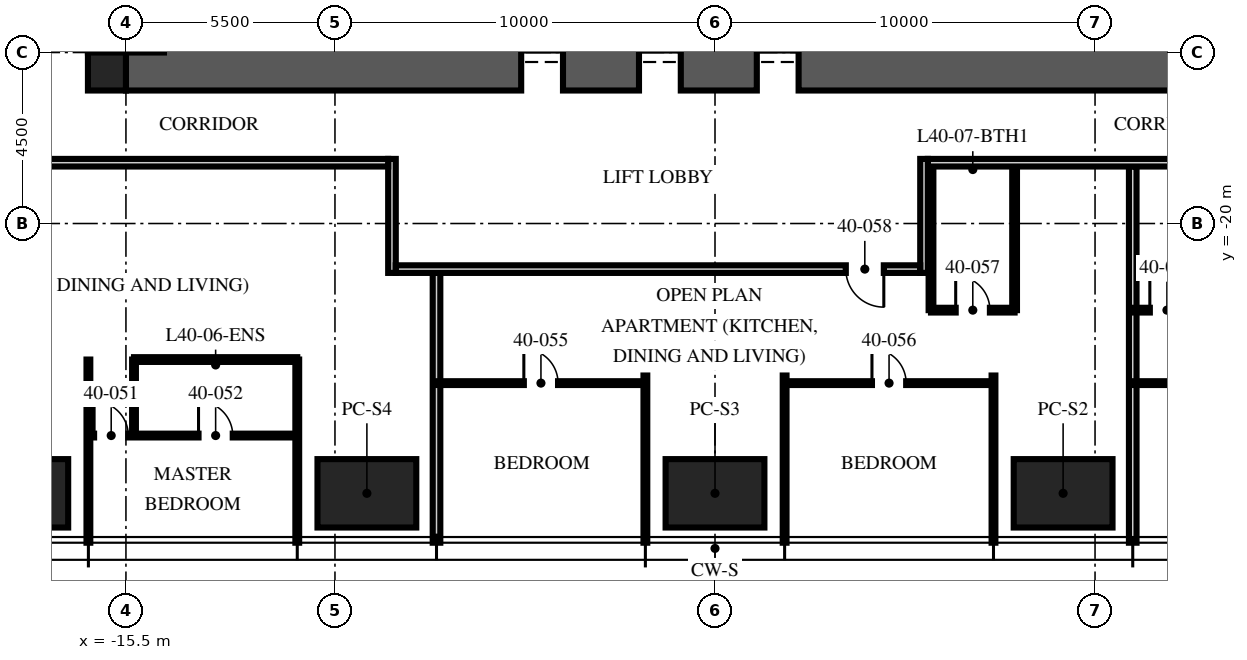
"""IFC4 building model, lengths in metres.
Left out: names, types, materials, properties, quantities, classifications, styles, units other than length and angle.
Written with IfcOpenShell. Run it as: python <this file> out.ifc"""

import sys

from ifc_helpers import new_model, si_unit, direction, frame, frame_2d, origin, origin_2d, place, context, subcontext, project, spatial, rectangle, extrude, element, fill, save


model = new_model("IFC4")
c1 = context("Model", 3, precision=1e-05, world=origin(), true_north=direction((0.0, 1.0)))
c2 = subcontext(c1, "Body", "Model", "MODEL_VIEW")
j1 = project(units=[si_unit("LENGTHUNIT", "METRE"), si_unit("PLANEANGLEUNIT", "RADIAN")], contexts=[c1])
p1 = place(None, origin())
s1 = spatial("IfcSite", under=j1, at=p1, CompositionType="ELEMENT")
p2 = place(p1, origin())
s2 = spatial("IfcBuilding", under=s1, at=p2, CompositionType="ELEMENT")
p3 = place(p2, frame((0.0, 0.0, 159.75)))
s3 = spatial("IfcBuildingStorey", under=s2, at=p3, CompositionType="ELEMENT", Elevation=159.75)
p4 = place(p3, frame((-15.5, -15.5, -0.25), z_axis=(0.0, 0.0, 1.0), x_axis=(1.0, 0.0, 0.0)))
e1 = element("IfcWall", 1, at=p4, inside=s3, PredefinedType="SHEAR", context=c2, shape_type="SweptSolid", body=[
    extrude(rectangle(XDim=31.0, YDim=2.0, at=frame_2d((15.5, 0.0))), origin(), (0.0, 0.0, 1.0), 3.75),
])
p5 = place(p4, frame((10.4, 0.0, 0.25)))
e2 = element("IfcOpeningElement", 2, at=p5, cuts=e1, PredefinedType="OPENING", context=c2, shape_type="SweptSolid", body=[
    extrude(rectangle(XDim=1.1, YDim=2.1, at=frame_2d((0.55, 1.05))), frame((0.0, 1.01, 0.0), z_axis=(0.0, -1.0, 0.0), x_axis=(1.0, 0.0, 0.0)), (0.0, 0.0, 1.0), 2.02),
])
p6 = place(p4, frame((13.5, 0.0, 0.25)))
e3 = element("IfcOpeningElement", 3, at=p6, cuts=e1, PredefinedType="OPENING", context=c2, shape_type="SweptSolid", body=[
    extrude(rectangle(XDim=1.1, YDim=2.1, at=frame_2d((0.55, 1.05))), frame((0.0, 1.01, 0.0), z_axis=(0.0, -1.0, 0.0), x_axis=(1.0, 0.0, 0.0)), (0.0, 0.0, 1.0), 2.02),
])
p7 = place(p4, frame((16.6, 0.0, 0.25)))
e4 = element("IfcOpeningElement", 4, at=p7, cuts=e1, PredefinedType="OPENING", context=c2, shape_type="SweptSolid", body=[
    extrude(rectangle(XDim=1.1, YDim=2.1, at=frame_2d((0.55, 1.05))), frame((0.0, 1.01, 0.0), z_axis=(0.0, -1.0, 0.0), x_axis=(1.0, 0.0, 0.0)), (0.0, 0.0, 1.0), 2.02),
])
p8 = place(p3, frame((-16.0, -16.0, -0.25), z_axis=(0.0, 0.0, 1.0), x_axis=(1.0, 0.0, 0.0)))
e5 = element("IfcColumn", 5, at=p8, inside=s3, PredefinedType="COLUMN", context=c2, shape_type="SweptSolid", body=[
    extrude(rectangle(XDim=1.0, YDim=1.0, at=origin_2d()), origin(), (0.0, 0.0, 1.0), 3.75),
])
for number, where, z_axis, x_axis in (
    (6, (9.16, -27.1, 0.0), (0.0, 0.0, 1.0), (1.0, 0.0, 0.0)),
    (7, (0.0, -27.1, 0.0), (0.0, 0.0, 1.0), (1.0, 0.0, 0.0)),
    (8, (-9.16, -27.1, 0.0), (0.0, 0.0, 1.0), (1.0, 0.0, 0.0)),
    (9, (-18.32, -27.1, 0.0), (0.0, 0.0, 1.0), (1.0, 0.0, 0.0)),
):
    element("IfcColumn", number, at=place(p3, frame(where, z_axis=z_axis, x_axis=x_axis)), inside=s3, PredefinedType="COLUMN", context=c2, shape_type="SweptSolid", body=[
        extrude(rectangle(XDim=2.6, YDim=1.8, at=origin_2d()), origin(), (0.0, 0.0, 1.0), 3.75),
    ])
for number, where, z_axis, x_axis in (
    (10, (-16.488, -23.58, 0.0), (0.0, 0.0, 1.0), (0.0, -1.0, 0.0)),
    (11, (-10.992, -23.58, 0.0), (0.0, 0.0, 1.0), (0.0, -1.0, 0.0)),
):
    element("IfcWall", number, at=place(p3, frame(where, z_axis=z_axis, x_axis=x_axis)), inside=s3, PredefinedType="PARTITIONING", context=c2, shape_type="SweptSolid", body=[
        extrude(rectangle(XDim=4.82, YDim=0.1, at=frame_2d((2.41, 0.0))), origin(), (0.0, 0.0, 1.0), 2.81),
    ])
p9 = place(p3, frame((-7.328, -21.3, 0.0), z_axis=(0.0, 0.0, 1.0), x_axis=(0.0, -1.0, 0.0)))
e12 = element("IfcWall", 12, at=p9, inside=s3, PredefinedType="PARTITIONING", context=c2, shape_type="SweptSolid", body=[
    extrude(rectangle(XDim=7.1, YDim=0.2, at=frame_2d((3.55, 0.0))), origin(), (0.0, 0.0, 1.0), 2.81),
])
for number, where, z_axis, x_axis in (
    (13, (-1.832, -24.0, 0.0), (0.0, 0.0, 1.0), (0.0, -1.0, 0.0)),
    (14, (1.832, -24.0, 0.0), (0.0, 0.0, 1.0), (0.0, -1.0, 0.0)),
    (15, (7.328, -24.0, 0.0), (0.0, 0.0, 1.0), (0.0, -1.0, 0.0)),
):
    element("IfcWall", number, at=place(p3, frame(where, z_axis=z_axis, x_axis=x_axis)), inside=s3, PredefinedType="PARTITIONING", context=c2, shape_type="SweptSolid", body=[
        extrude(rectangle(XDim=4.4, YDim=0.1, at=frame_2d((2.2, 0.0))), origin(), (0.0, 0.0, 1.0), 2.81),
    ])
p10 = place(p3, frame((10.992, -18.5, 0.0), z_axis=(0.0, 0.0, 1.0), x_axis=(0.0, -1.0, 0.0)))
e16 = element("IfcWall", 16, at=p10, inside=s3, PredefinedType="PARTITIONING", context=c2, shape_type="SweptSolid", body=[
    extrude(rectangle(XDim=9.9, YDim=0.2, at=frame_2d((4.95, 0.0))), origin(), (0.0, 0.0, 1.0), 2.81),
])
p11 = place(p3, frame((-16.488, -25.58, 0.0), z_axis=(0.0, 0.0, 1.0), x_axis=(1.0, 0.0, 0.0)))
e17 = element("IfcWall", 17, at=p11, inside=s3, PredefinedType="PARTITIONING", context=c2, shape_type="SweptSolid", body=[
    extrude(rectangle(XDim=5.496, YDim=0.1, at=frame_2d((2.748, 0.0))), origin(), (0.0, 0.0, 1.0), 2.81),
])
p12 = place(p11, frame((0.15, 0.0, 0.0)))
e18 = element("IfcOpeningElement", 18, at=p12, cuts=e17, PredefinedType="OPENING", context=c2, shape_type="SweptSolid", body=[
    extrude(rectangle(XDim=0.9, YDim=2.1, at=frame_2d((0.45, 1.05))), frame((0.0, 0.06, 0.0), z_axis=(0.0, -1.0, 0.0), x_axis=(1.0, 0.0, 0.0)), (0.0, 0.0, 1.0), 0.12),
])
p13 = place(p11, frame((2.898, 0.0, 0.0)))
e19 = element("IfcOpeningElement", 19, at=p13, cuts=e17, PredefinedType="OPENING", context=c2, shape_type="SweptSolid", body=[
    extrude(rectangle(XDim=0.9, YDim=2.1, at=frame_2d((0.45, 1.05))), frame((0.0, 0.06, 0.0), z_axis=(0.0, -1.0, 0.0), x_axis=(1.0, 0.0, 0.0)), (0.0, 0.0, 1.0), 0.12),
])
p14 = place(p3, frame((-15.288, -23.58, 0.0), z_axis=(0.0, 0.0, 1.0), x_axis=(0.0, -1.0, 0.0)))
e20 = element("IfcWall", 20, at=p14, inside=s3, PredefinedType="PARTITIONING", context=c2, shape_type="SweptSolid", body=[
    extrude(rectangle(XDim=2.0, YDim=0.1, at=frame_2d((1.0, 0.0))), origin(), (0.0, 0.0, 1.0), 3.5),
])
p15 = place(p3, frame((-15.288, -23.58, 0.0), z_axis=(0.0, 0.0, 1.0), x_axis=(1.0, 0.0, 0.0)))
e21 = element("IfcWall", 21, at=p15, inside=s3, PredefinedType="PARTITIONING", context=c2, shape_type="SweptSolid", body=[
    extrude(rectangle(XDim=4.296, YDim=0.125, at=frame_2d((2.148, 0.0))), origin(), (0.0, 0.0, 1.0), 2.81),
])
p16 = place(p3, frame((-7.328, -24.2, 0.0), z_axis=(0.0, 0.0, 1.0), x_axis=(1.0, 0.0, 0.0)))
e22 = element("IfcWall", 22, at=p16, inside=s3, PredefinedType="PARTITIONING", context=c2, shape_type="SweptSolid", body=[
    extrude(rectangle(XDim=5.496, YDim=0.1, at=frame_2d((2.748, 0.0))), origin(), (0.0, 0.0, 1.0), 2.81),
])
p17 = place(p16, frame((2.298, 0.0, 0.0)))
e23 = element("IfcOpeningElement", 23, at=p17, cuts=e22, PredefinedType="OPENING", context=c2, shape_type="SweptSolid", body=[
    extrude(rectangle(XDim=0.9, YDim=2.1, at=frame_2d((0.45, 1.05))), frame((0.0, 0.06, 0.0), z_axis=(0.0, -1.0, 0.0), x_axis=(1.0, 0.0, 0.0)), (0.0, 0.0, 1.0), 0.12),
])
p18 = place(p3, frame((1.832, -24.2, 0.0), z_axis=(0.0, 0.0, 1.0), x_axis=(1.0, 0.0, 0.0)))
e24 = element("IfcWall", 24, at=p18, inside=s3, PredefinedType="PARTITIONING", context=c2, shape_type="SweptSolid", body=[
    extrude(rectangle(XDim=5.496, YDim=0.1, at=frame_2d((2.748, 0.0))), origin(), (0.0, 0.0, 1.0), 2.81),
])
p19 = place(p18, frame((2.298, 0.0, 0.0)))
e25 = element("IfcOpeningElement", 25, at=p19, cuts=e24, PredefinedType="OPENING", context=c2, shape_type="SweptSolid", body=[
    extrude(rectangle(XDim=0.9, YDim=2.1, at=frame_2d((0.45, 1.05))), frame((0.0, 0.06, 0.0), z_axis=(0.0, -1.0, 0.0), x_axis=(1.0, 0.0, 0.0)), (0.0, 0.0, 1.0), 0.12),
])
p20 = place(p3, frame((5.684, -22.28, 0.0), z_axis=(0.0, 0.0, 1.0), x_axis=(1.0, 0.0, 0.0)))
e26 = element("IfcWall", 26, at=p20, inside=s3, PredefinedType="PARTITIONING", context=c2, shape_type="SweptSolid", body=[
    extrude(rectangle(XDim=2.2, YDim=0.125, at=frame_2d((1.1, 0.0))), origin(), (0.0, 0.0, 1.0), 3.5),
])
p21 = place(p20, frame((0.65, 0.0, 0.0)))
e27 = element("IfcOpeningElement", 27, at=p21, cuts=e26, PredefinedType="OPENING", context=c2, shape_type="SweptSolid", body=[
    extrude(rectangle(XDim=0.9, YDim=2.1, at=frame_2d((0.45, 1.05))), frame((0.0, 0.073, 0.0), z_axis=(0.0, -1.0, 0.0), x_axis=(1.0, 0.0, 0.0)), (0.0, 0.0, 1.0), 0.145),
])
for number, where, z_axis, x_axis in (
    (28, (5.684, -18.5, 0.0), (0.0, 0.0, 1.0), (0.0, -1.0, 0.0)),
    (29, (7.884, -18.5, 0.0), (0.0, 0.0, 1.0), (0.0, -1.0, 0.0)),
):
    element("IfcWall", number, at=place(p3, frame(where, z_axis=z_axis, x_axis=x_axis)), inside=s3, PredefinedType="PARTITIONING", context=c2, shape_type="SweptSolid", body=[
        extrude(rectangle(XDim=3.78, YDim=0.125, at=frame_2d((1.89, 0.0))), origin(), (0.0, 0.0, 1.0), 3.5),
    ])
p22 = place(p3, frame((10.992, -24.2, 0.0), z_axis=(0.0, 0.0, 1.0), x_axis=(1.0, 0.0, 0.0)))
e30 = element("IfcWall", 30, at=p22, inside=s3, PredefinedType="PARTITIONING", context=c2, shape_type="SweptSolid", body=[
    extrude(rectangle(XDim=5.496, YDim=0.1, at=frame_2d((2.748, 0.0))), origin(), (0.0, 0.0, 1.0), 2.81),
])
p23 = place(p22, frame((2.298, 0.0, 0.0)))
e31 = element("IfcOpeningElement", 31, at=p23, cuts=e30, PredefinedType="OPENING", context=c2, shape_type="SweptSolid", body=[
    extrude(rectangle(XDim=0.9, YDim=2.1, at=frame_2d((0.45, 1.05))), frame((0.0, 0.06, 0.0), z_axis=(0.0, -1.0, 0.0), x_axis=(1.0, 0.0, 0.0)), (0.0, 0.0, 1.0), 0.12),
])
p24 = place(p3, frame((10.992, -22.28, 0.0), z_axis=(0.0, 0.0, 1.0), x_axis=(1.0, 0.0, 0.0)))
e32 = element("IfcWall", 32, at=p24, inside=s3, PredefinedType="PARTITIONING", context=c2, shape_type="SweptSolid", body=[
    extrude(rectangle(XDim=1.8, YDim=0.125, at=frame_2d((0.9, 0.0))), origin(), (0.0, 0.0, 1.0), 3.5),
])
p25 = place(p24, frame((0.45, 0.0, 0.0)))
e33 = element("IfcOpeningElement", 33, at=p25, cuts=e32, PredefinedType="OPENING", context=c2, shape_type="SweptSolid", body=[
    extrude(rectangle(XDim=0.9, YDim=2.1, at=frame_2d((0.45, 1.05))), frame((0.0, 0.073, 0.0), z_axis=(0.0, -1.0, 0.0), x_axis=(1.0, 0.0, 0.0)), (0.0, 0.0, 1.0), 0.145),
])
p26 = place(p3, frame((18.5, -18.4, 0.0), z_axis=(0.0, 0.0, 1.0), x_axis=(-1.0, 0.0, 0.0)))
e34 = element("IfcWall", 34, at=p26, inside=s3, PredefinedType="PARTITIONING", context=c2, shape_type="SweptSolid", body=[
    extrude(rectangle(XDim=12.9, YDim=0.2, at=frame_2d((6.45, 0.0))), origin(), (0.0, 0.0, 1.0), 2.3),
])
for number, where, z_axis, x_axis in (
    (35, (5.5, -18.3, 0.0), (0.0, 0.0, 1.0), (0.0, -1.0, 0.0)),
    (36, (-8.5, -18.3, 0.0), (0.0, 0.0, 1.0), (0.0, -1.0, 0.0)),
):
    element("IfcWall", number, at=place(p3, frame(where, z_axis=z_axis, x_axis=x_axis)), inside=s3, PredefinedType="PARTITIONING", context=c2, shape_type="SweptSolid", body=[
        extrude(rectangle(XDim=3.0, YDim=0.2, at=frame_2d((1.5, 0.0))), origin(), (0.0, 0.0, 1.0), 3.5),
    ])
p27 = place(p3, frame((5.4, -21.2, 0.0), z_axis=(0.0, 0.0, 1.0), x_axis=(-1.0, 0.0, 0.0)))
e37 = element("IfcWall", 37, at=p27, inside=s3, PredefinedType="PARTITIONING", context=c2, shape_type="SweptSolid", body=[
    extrude(rectangle(XDim=13.8, YDim=0.2, at=frame_2d((6.9, 0.0))), origin(), (0.0, 0.0, 1.0), 2.7),
])
p28 = place(p27, frame((0.958, 0.0, 0.0)))
e38 = element("IfcOpeningElement", 38, at=p28, cuts=e37, PredefinedType="OPENING", context=c2, shape_type="SweptSolid", body=[
    extrude(rectangle(XDim=1.0, YDim=2.2, at=frame_2d((0.5, 1.1))), frame((0.0, 0.11, 0.0), z_axis=(0.0, -1.0, 0.0), x_axis=(1.0, 0.0, 0.0)), (0.0, 0.0, 1.0), 0.22),
])
p29 = place(p3, frame((-8.6, -18.4, 0.0), z_axis=(0.0, 0.0, 1.0), x_axis=(-1.0, 0.0, 0.0)))
e39 = element("IfcWall", 39, at=p29, inside=s3, PredefinedType="PARTITIONING", context=c2, shape_type="SweptSolid", body=[
    extrude(rectangle(XDim=9.9, YDim=0.2, at=frame_2d((4.95, 0.0))), origin(), (0.0, 0.0, 1.0), 2.3),
])
p30 = place(p5, origin())
e40 = element("IfcDoor", 40, at=p30, inside=s3, OperationType="DOUBLE_DOOR_SLIDING", PredefinedType="DOOR", context=c2, shape_type="SweptSolid", body=[
    extrude(rectangle(XDim=1.1, YDim=2.1, at=frame_2d((0.55, 1.05))), frame((0.0, 0.025, 0.0), z_axis=(0.0, -1.0, 0.0), x_axis=(1.0, 0.0, 0.0)), (0.0, 0.0, 1.0), 0.05),
])
fill(e2, e40)
p31 = place(p6, origin())
e41 = element("IfcDoor", 41, at=p31, inside=s3, OperationType="DOUBLE_DOOR_SLIDING", PredefinedType="DOOR", context=c2, shape_type="SweptSolid", body=[
    extrude(rectangle(XDim=1.1, YDim=2.1, at=frame_2d((0.55, 1.05))), frame((0.0, 0.025, 0.0), z_axis=(0.0, -1.0, 0.0), x_axis=(1.0, 0.0, 0.0)), (0.0, 0.0, 1.0), 0.05),
])
fill(e3, e41)
p32 = place(p7, origin())
e42 = element("IfcDoor", 42, at=p32, inside=s3, OperationType="DOUBLE_DOOR_SLIDING", PredefinedType="DOOR", context=c2, shape_type="SweptSolid", body=[
    extrude(rectangle(XDim=1.1, YDim=2.1, at=frame_2d((0.55, 1.05))), frame((0.0, 0.025, 0.0), z_axis=(0.0, -1.0, 0.0), x_axis=(1.0, 0.0, 0.0)), (0.0, 0.0, 1.0), 0.05),
])
fill(e4, e42)
p33 = place(p12, origin())
e43 = element("IfcDoor", 43, at=p33, inside=s3, OperationType="SINGLE_SWING_LEFT", PredefinedType="DOOR", context=c2, shape_type="SweptSolid", body=[
    extrude(rectangle(XDim=0.9, YDim=2.1, at=frame_2d((0.45, 1.05))), frame((0.0, 0.025, 0.0), z_axis=(0.0, -1.0, 0.0), x_axis=(1.0, 0.0, 0.0)), (0.0, 0.0, 1.0), 0.05),
])
fill(e18, e43)
p34 = place(p13, origin())
e44 = element("IfcDoor", 44, at=p34, inside=s3, OperationType="SINGLE_SWING_LEFT", PredefinedType="DOOR", context=c2, shape_type="SweptSolid", body=[
    extrude(rectangle(XDim=0.9, YDim=2.1, at=frame_2d((0.45, 1.05))), frame((0.0, 0.025, 0.0), z_axis=(0.0, -1.0, 0.0), x_axis=(1.0, 0.0, 0.0)), (0.0, 0.0, 1.0), 0.05),
])
fill(e19, e44)
p35 = place(p17, origin())
e45 = element("IfcDoor", 45, at=p35, inside=s3, OperationType="SINGLE_SWING_LEFT", PredefinedType="DOOR", context=c2, shape_type="SweptSolid", body=[
    extrude(rectangle(XDim=0.9, YDim=2.1, at=frame_2d((0.45, 1.05))), frame((0.0, 0.025, 0.0), z_axis=(0.0, -1.0, 0.0), x_axis=(1.0, 0.0, 0.0)), (0.0, 0.0, 1.0), 0.05),
])
fill(e23, e45)
p36 = place(p19, origin())
e46 = element("IfcDoor", 46, at=p36, inside=s3, OperationType="SINGLE_SWING_LEFT", PredefinedType="DOOR", context=c2, shape_type="SweptSolid", body=[
    extrude(rectangle(XDim=0.9, YDim=2.1, at=frame_2d((0.45, 1.05))), frame((0.0, 0.025, 0.0), z_axis=(0.0, -1.0, 0.0), x_axis=(1.0, 0.0, 0.0)), (0.0, 0.0, 1.0), 0.05),
])
fill(e25, e46)
p37 = place(p21, origin())
e47 = element("IfcDoor", 47, at=p37, inside=s3, OperationType="SINGLE_SWING_LEFT", PredefinedType="DOOR", context=c2, shape_type="SweptSolid", body=[
    extrude(rectangle(XDim=0.9, YDim=2.1, at=frame_2d((0.45, 1.05))), frame((0.0, 0.025, 0.0), z_axis=(0.0, -1.0, 0.0), x_axis=(1.0, 0.0, 0.0)), (0.0, 0.0, 1.0), 0.05),
])
fill(e27, e47)
p38 = place(p28, origin())
e48 = element("IfcDoor", 48, at=p38, inside=s3, OperationType="SINGLE_SWING_LEFT", PredefinedType="DOOR", context=c2, shape_type="SweptSolid", body=[
    extrude(rectangle(XDim=1.0, YDim=2.2, at=frame_2d((0.5, 1.1))), frame((0.0, 0.025, 0.0), z_axis=(0.0, -1.0, 0.0), x_axis=(1.0, 0.0, 0.0)), (0.0, 0.0, 1.0), 0.05),
])
fill(e38, e48)
p39 = place(p25, origin())
e49 = element("IfcDoor", 49, at=p39, inside=s3, OperationType="SINGLE_SWING_LEFT", PredefinedType="DOOR", context=c2, shape_type="SweptSolid", body=[
    extrude(rectangle(XDim=0.9, YDim=2.1, at=frame_2d((0.45, 1.05))), frame((0.0, 0.025, 0.0), z_axis=(0.0, -1.0, 0.0), x_axis=(1.0, 0.0, 0.0)), (0.0, 0.0, 1.0), 0.05),
])
fill(e33, e49)
save(model, sys.argv[1])
